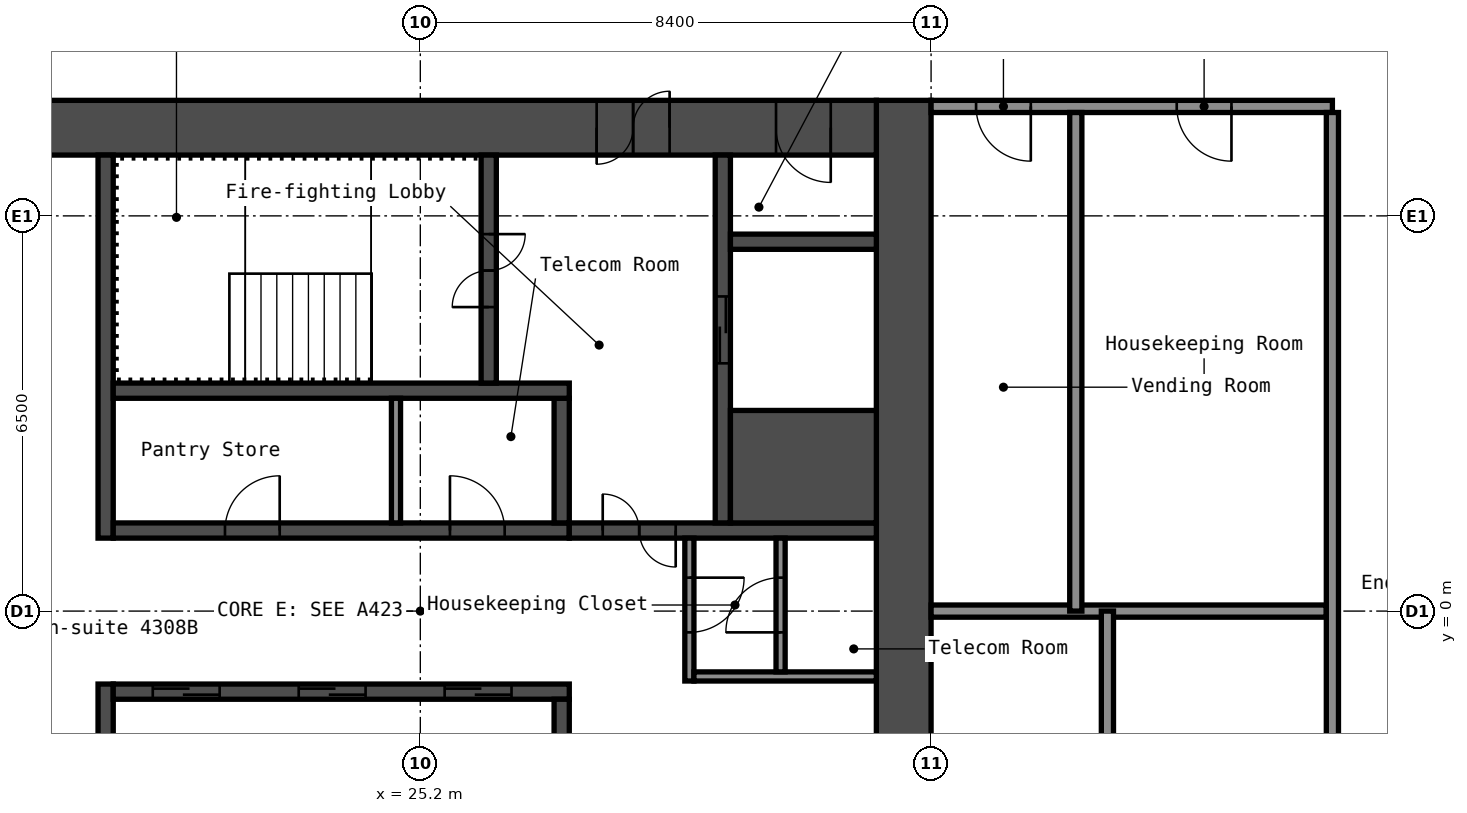
"""IFC4 building model, lengths in metres.
Left out: names, types, materials, properties, quantities, classifications, styles, units other than length and angle.
Written with IfcOpenShell. Run it as: python <this file> out.ifc"""

import sys

from ifc_helpers import new_model, si_unit, direction, frame, frame_2d, origin, place, context, subcontext, project, spatial, rectangle, extrude, element, fill, save


model = new_model("IFC4")
c1 = context("Model", 3, precision=1e-05, world=origin(), true_north=direction((0.0, 1.0)))
c2 = subcontext(c1, "Body", "Model", "MODEL_VIEW")
j1 = project(units=[si_unit("LENGTHUNIT", "METRE"), si_unit("PLANEANGLEUNIT", "RADIAN")], contexts=[c1])
p1 = place(None, origin())
s1 = spatial("IfcSite", under=j1, at=p1, CompositionType="ELEMENT")
p2 = place(p1, origin())
s2 = spatial("IfcBuilding", under=s1, at=p2, CompositionType="ELEMENT")
p3 = place(p2, frame((0.0, 0.0, 153.4)))
s3 = spatial("IfcBuildingStorey", under=s2, at=p3, CompositionType="ELEMENT", Elevation=153.4)
p4 = place(p3, frame((33.15, -8.4, 0.0), z_axis=(0.0, 0.0, 1.0), x_axis=(0.0, 1.0, 0.0)))
e1 = element("IfcWall", 1, at=p4, inside=s3, PredefinedType="SHEAR", context=c2, shape_type="SweptSolid", body=[
    extrude(rectangle(XDim=16.8, YDim=0.9, at=frame_2d((8.4, 0.0))), origin(), (0.0, 0.0, 1.0), 2.75),
])
p5 = place(p3, frame((17.7, 7.95, 0.0), z_axis=(0.0, 0.0, 1.0), x_axis=(1.0, 0.0, 0.0)))
e2 = element("IfcWall", 2, at=p5, inside=s3, PredefinedType="SHEAR", context=c2, shape_type="SweptSolid", body=[
    extrude(rectangle(XDim=15.0, YDim=0.9, at=frame_2d((7.5, 0.0))), origin(), (0.0, 0.0, 1.0), 2.75),
])
p6 = place(p5, frame((10.4, 0.0, 0.0)))
e3 = element("IfcOpeningElement", 3, at=p6, cuts=e2, PredefinedType="OPENING", context=c2, shape_type="SweptSolid", body=[
    extrude(rectangle(XDim=1.2, YDim=2.1, at=frame_2d((0.6, 1.05))), frame((0.0, 0.46, 0.0), z_axis=(0.0, -1.0, 0.0), x_axis=(1.0, 0.0, 0.0)), (0.0, 0.0, 1.0), 0.92),
])
p7 = place(p5, frame((13.35, 0.0, 0.0)))
e4 = element("IfcOpeningElement", 4, at=p7, cuts=e2, PredefinedType="OPENING", context=c2, shape_type="SweptSolid", body=[
    extrude(rectangle(XDim=0.9, YDim=2.1, at=frame_2d((0.45, 1.05))), frame((0.0, 0.46, 0.0), z_axis=(0.0, -1.0, 0.0), x_axis=(1.0, 0.0, 0.0)), (0.0, 0.0, 1.0), 0.92),
])
p8 = place(p3, frame((20.025, 1.2, 0.0), z_axis=(0.0, 0.0, 1.0), x_axis=(0.0, 1.0, 0.0)))
e5 = element("IfcWall", 5, at=p8, inside=s3, PredefinedType="SHEAR", context=c2, shape_type="SweptSolid", body=[
    extrude(rectangle(XDim=6.3, YDim=0.25, at=frame_2d((3.15, 0.0))), origin(), (0.0, 0.0, 1.0), 2.75),
])
p9 = place(p3, frame((20.025, -7.5, 0.0), z_axis=(0.0, 0.0, 1.0), x_axis=(0.0, 1.0, 0.0)))
e6 = element("IfcWall", 6, at=p9, inside=s3, PredefinedType="SHEAR", context=c2, shape_type="SweptSolid", body=[
    extrude(rectangle(XDim=6.3, YDim=0.25, at=frame_2d((3.15, 0.0))), origin(), (0.0, 0.0, 1.0), 2.75),
])
p10 = place(p9, frame((2.4, 0.0, 0.0)))
e7 = element("IfcOpeningElement", 7, at=p10, cuts=e6, PredefinedType="OPENING", context=c2, shape_type="SweptSolid", body=[
    extrude(rectangle(XDim=1.0, YDim=2.1, at=frame_2d((0.5, 1.05))), frame((0.0, 0.135, 0.0), z_axis=(0.0, -1.0, 0.0), x_axis=(1.0, 0.0, 0.0)), (0.0, 0.0, 1.0), 0.27),
])
p11 = place(p3, frame((20.15, 1.325, 0.0), z_axis=(0.0, 0.0, 1.0), x_axis=(1.0, 0.0, 0.0)))
e8 = element("IfcWall", 8, at=p11, inside=s3, PredefinedType="SHEAR", context=c2, shape_type="SweptSolid", body=[
    extrude(rectangle(XDim=7.5, YDim=0.25, at=frame_2d((3.75, 0.0))), origin(), (0.0, 0.0, 1.0), 2.75),
])
p12 = place(p11, frame((1.837, 0.0, 0.0)))
e9 = element("IfcOpeningElement", 9, at=p12, cuts=e8, PredefinedType="OPENING", context=c2, shape_type="SweptSolid", body=[
    extrude(rectangle(XDim=0.9, YDim=2.1, at=frame_2d((0.45, 1.05))), frame((0.0, 0.135, 0.0), z_axis=(0.0, -1.0, 0.0), x_axis=(1.0, 0.0, 0.0)), (0.0, 0.0, 1.0), 0.27),
])
p13 = place(p11, frame((5.538, 0.0, 0.0)))
e10 = element("IfcOpeningElement", 10, at=p13, cuts=e8, PredefinedType="OPENING", context=c2, shape_type="SweptSolid", body=[
    extrude(rectangle(XDim=0.9, YDim=2.1, at=frame_2d((0.45, 1.05))), frame((0.0, 0.135, 0.0), z_axis=(0.0, -1.0, 0.0), x_axis=(1.0, 0.0, 0.0)), (0.0, 0.0, 1.0), 0.27),
])
p14 = place(p3, frame((27.525, 1.45, 0.0), z_axis=(0.0, 0.0, 1.0), x_axis=(0.0, 1.0, 0.0)))
e11 = element("IfcWall", 11, at=p14, inside=s3, PredefinedType="SHEAR", context=c2, shape_type="SweptSolid", body=[
    extrude(rectangle(XDim=2.05, YDim=0.25, at=frame_2d((1.025, 0.0))), origin(), (0.0, 0.0, 1.0), 2.75),
])
p15 = place(p3, frame((20.15, 3.625, 0.0), z_axis=(0.0, 0.0, 1.0), x_axis=(1.0, 0.0, 0.0)))
e12 = element("IfcWall", 12, at=p15, inside=s3, PredefinedType="SHEAR", context=c2, shape_type="SweptSolid", body=[
    extrude(rectangle(XDim=7.5, YDim=0.25, at=frame_2d((3.75, 0.0))), origin(), (0.0, 0.0, 1.0), 2.75),
])
p16 = place(p3, frame((26.325, 3.75, 0.0), z_axis=(0.0, 0.0, 1.0), x_axis=(0.0, 1.0, 0.0)))
e13 = element("IfcWall", 13, at=p16, inside=s3, PredefinedType="SHEAR", context=c2, shape_type="SweptSolid", body=[
    extrude(rectangle(XDim=3.75, YDim=0.25, at=frame_2d((1.875, 0.0))), origin(), (0.0, 0.0, 1.0), 2.75),
])
p17 = place(p16, frame((1.25, 0.0, 0.0)))
e14 = element("IfcOpeningElement", 14, at=p17, cuts=e13, PredefinedType="OPENING", context=c2, shape_type="SweptSolid", body=[
    extrude(rectangle(XDim=1.2, YDim=2.1, at=frame_2d((0.6, 1.05))), frame((0.0, 0.135, 0.0), z_axis=(0.0, -1.0, 0.0), x_axis=(1.0, 0.0, 0.0)), (0.0, 0.0, 1.0), 0.27),
])
p18 = place(p3, frame((27.65, 1.325, 0.0), z_axis=(0.0, 0.0, 1.0), x_axis=(1.0, 0.0, 0.0)))
e15 = element("IfcWall", 15, at=p18, inside=s3, PredefinedType="SHEAR", context=c2, shape_type="SweptSolid", body=[
    extrude(rectangle(XDim=5.05, YDim=0.25, at=frame_2d((2.525, 0.0))), origin(), (0.0, 0.0, 1.0), 2.75),
])
p19 = place(p18, frame((0.55, 0.0, 0.0)))
e16 = element("IfcOpeningElement", 16, at=p19, cuts=e15, PredefinedType="OPENING", context=c2, shape_type="SweptSolid", body=[
    extrude(rectangle(XDim=1.2, YDim=2.1, at=frame_2d((0.6, 1.05))), frame((0.0, 0.135, 0.0), z_axis=(0.0, -1.0, 0.0), x_axis=(1.0, 0.0, 0.0)), (0.0, 0.0, 1.0), 0.27),
])
p20 = place(p3, frame((30.175, 1.45, 0.0), z_axis=(0.0, 0.0, 1.0), x_axis=(0.0, 1.0, 0.0)))
e17 = element("IfcWall", 17, at=p20, inside=s3, PredefinedType="SHEAR", context=c2, shape_type="SweptSolid", body=[
    extrude(rectangle(XDim=6.05, YDim=0.25, at=frame_2d((3.025, 0.0))), origin(), (0.0, 0.0, 1.0), 2.75),
])
p21 = place(p20, frame((2.625, 0.0, 0.0)))
e18 = element("IfcOpeningElement", 18, at=p21, cuts=e17, PredefinedType="OPENING", context=c2, shape_type="SweptSolid", body=[
    extrude(rectangle(XDim=1.1, YDim=2.1, at=frame_2d((0.55, 1.05))), frame((0.0, 0.135, 0.0), z_axis=(0.0, -1.0, 0.0), x_axis=(1.0, 0.0, 0.0)), (0.0, 0.0, 1.0), 0.27),
])
p22 = place(p3, frame((30.3, 2.375, 0.0), z_axis=(0.0, 0.0, 1.0), x_axis=(1.0, 0.0, 0.0)))
e19 = element("IfcWall", 19, at=p22, inside=s3, PredefinedType="SHEAR", context=c2, shape_type="SweptSolid", body=[
    extrude(rectangle(XDim=2.4, YDim=1.85, at=frame_2d((1.2, 0.0))), origin(), (0.0, 0.0, 1.0), 2.75),
])
p23 = place(p3, frame((30.3, 6.075, 0.0), z_axis=(0.0, 0.0, 1.0), x_axis=(1.0, 0.0, 0.0)))
e20 = element("IfcWall", 20, at=p23, inside=s3, PredefinedType="SHEAR", context=c2, shape_type="SweptSolid", body=[
    extrude(rectangle(XDim=2.4, YDim=0.25, at=frame_2d((1.2, 0.0))), origin(), (0.0, 0.0, 1.0), 2.75),
])
p24 = place(p3, frame((20.15, -1.325, 0.0), z_axis=(0.0, 0.0, 1.0), x_axis=(1.0, 0.0, 0.0)))
e21 = element("IfcWall", 21, at=p24, inside=s3, PredefinedType="SHEAR", context=c2, shape_type="SweptSolid", body=[
    extrude(rectangle(XDim=7.5, YDim=0.25, at=frame_2d((3.75, 0.0))), origin(), (0.0, 0.0, 1.0), 2.75),
])
p25 = place(p24, frame((0.65, 0.0, 0.0)))
e22 = element("IfcOpeningElement", 22, at=p25, cuts=e21, PredefinedType="OPENING", context=c2, shape_type="SweptSolid", body=[
    extrude(rectangle(XDim=1.1, YDim=2.1, at=frame_2d((0.55, 1.05))), frame((0.0, 0.135, 0.0), z_axis=(0.0, -1.0, 0.0), x_axis=(1.0, 0.0, 0.0)), (0.0, 0.0, 1.0), 0.27),
])
p26 = place(p24, frame((3.05, 0.0, 0.0)))
e23 = element("IfcOpeningElement", 23, at=p26, cuts=e21, PredefinedType="OPENING", context=c2, shape_type="SweptSolid", body=[
    extrude(rectangle(XDim=1.1, YDim=2.1, at=frame_2d((0.55, 1.05))), frame((0.0, 0.135, 0.0), z_axis=(0.0, -1.0, 0.0), x_axis=(1.0, 0.0, 0.0)), (0.0, 0.0, 1.0), 0.27),
])
p27 = place(p24, frame((5.45, 0.0, 0.0)))
e24 = element("IfcOpeningElement", 24, at=p27, cuts=e21, PredefinedType="OPENING", context=c2, shape_type="SweptSolid", body=[
    extrude(rectangle(XDim=1.1, YDim=2.1, at=frame_2d((0.55, 1.05))), frame((0.0, 0.135, 0.0), z_axis=(0.0, -1.0, 0.0), x_axis=(1.0, 0.0, 0.0)), (0.0, 0.0, 1.0), 0.27),
])
p28 = place(p3, frame((27.525, -3.5, 0.0), z_axis=(0.0, 0.0, 1.0), x_axis=(0.0, 1.0, 0.0)))
e25 = element("IfcWall", 25, at=p28, inside=s3, PredefinedType="SHEAR", context=c2, shape_type="SweptSolid", body=[
    extrude(rectangle(XDim=2.05, YDim=0.25, at=frame_2d((1.025, 0.0))), origin(), (0.0, 0.0, 1.0), 2.75),
])
p29 = place(p3, frame((29.625, -1.15, 0.0), z_axis=(0.0, 0.0, 1.0), x_axis=(0.0, 1.0, 0.0)))
e26 = element("IfcWall", 26, at=p29, inside=s3, PredefinedType="PARTITIONING", context=c2, shape_type="SweptSolid", body=[
    extrude(rectangle(XDim=2.35, YDim=0.15, at=frame_2d((1.175, 0.0))), origin(), (0.0, 0.0, 1.0), 2.75),
])
p30 = place(p29, frame((0.8, 0.0, 0.0)))
e27 = element("IfcOpeningElement", 27, at=p30, cuts=e26, PredefinedType="OPENING", context=c2, shape_type="SweptSolid", body=[
    extrude(rectangle(XDim=0.9, YDim=2.1, at=frame_2d((0.45, 1.05))), frame((0.0, 0.085, 0.0), z_axis=(0.0, -1.0, 0.0), x_axis=(1.0, 0.0, 0.0)), (0.0, 0.0, 1.0), 0.17),
])
p31 = place(p3, frame((29.7, -1.075, 0.0), z_axis=(0.0, 0.0, 1.0), x_axis=(1.0, 0.0, 0.0)))
e28 = element("IfcWall", 28, at=p31, inside=s3, PredefinedType="PARTITIONING", context=c2, shape_type="SweptSolid", body=[
    extrude(rectangle(XDim=3.0, YDim=0.15, at=frame_2d((1.5, 0.0))), origin(), (0.0, 0.0, 1.0), 2.75),
])
p32 = place(p3, frame((31.125, -1.0, 0.0), z_axis=(0.0, 0.0, 1.0), x_axis=(0.0, 1.0, 0.0)))
e29 = element("IfcWall", 29, at=p32, inside=s3, PredefinedType="PARTITIONING", context=c2, shape_type="SweptSolid", body=[
    extrude(rectangle(XDim=2.2, YDim=0.15, at=frame_2d((1.1, 0.0))), origin(), (0.0, 0.0, 1.0), 2.75),
])
p33 = place(p32, frame((0.65, 0.0, 0.0)))
e30 = element("IfcOpeningElement", 30, at=p33, cuts=e29, PredefinedType="OPENING", context=c2, shape_type="SweptSolid", body=[
    extrude(rectangle(XDim=0.9, YDim=2.1, at=frame_2d((0.45, 1.05))), frame((0.0, 0.085, 0.0), z_axis=(0.0, -1.0, 0.0), x_axis=(1.0, 0.0, 0.0)), (0.0, 0.0, 1.0), 0.17),
])
p34 = place(p3, frame((24.8, 1.45, 0.0), z_axis=(0.0, 0.0, 1.0), x_axis=(0.0, 1.0, 0.0)))
e31 = element("IfcWall", 31, at=p34, inside=s3, PredefinedType="PARTITIONING", context=c2, shape_type="SweptSolid", body=[
    extrude(rectangle(XDim=2.05, YDim=0.15, at=frame_2d((1.025, 0.0))), origin(), (0.0, 0.0, 1.0), 2.75),
])
p35 = place(p3, frame((33.6, 0.0, 0.0), z_axis=(0.0, 0.0, 1.0), x_axis=(1.0, 0.0, 0.0)))
e32 = element("IfcWall", 32, at=p35, inside=s3, PredefinedType="PARTITIONING", context=c2, shape_type="SweptSolid", body=[
    extrude(rectangle(XDim=6.5, YDim=0.2, at=frame_2d((3.25, 0.0))), origin(), (0.0, 0.0, 1.0), 2.75),
])
p36 = place(p3, frame((33.6, 8.3, 0.0), z_axis=(0.0, 0.0, 1.0), x_axis=(1.0, 0.0, 0.0)))
e33 = element("IfcWall", 33, at=p36, inside=s3, PredefinedType="PARTITIONING", context=c2, shape_type="SweptSolid", body=[
    extrude(rectangle(XDim=6.6, YDim=0.2, at=frame_2d((3.3, 0.0))), origin(), (0.0, 0.0, 1.0), 2.75),
])
p37 = place(p36, frame((0.74, 0.0, 0.0)))
e34 = element("IfcOpeningElement", 34, at=p37, cuts=e33, PredefinedType="OPENING", context=c2, shape_type="SweptSolid", body=[
    extrude(rectangle(XDim=0.9, YDim=2.1, at=frame_2d((0.45, 1.05))), frame((0.0, 0.11, 0.0), z_axis=(0.0, -1.0, 0.0), x_axis=(1.0, 0.0, 0.0)), (0.0, 0.0, 1.0), 0.22),
])
p38 = place(p36, frame((4.04, 0.0, 0.0)))
e35 = element("IfcOpeningElement", 35, at=p38, cuts=e33, PredefinedType="OPENING", context=c2, shape_type="SweptSolid", body=[
    extrude(rectangle(XDim=0.9, YDim=2.1, at=frame_2d((0.45, 1.05))), frame((0.0, 0.11, 0.0), z_axis=(0.0, -1.0, 0.0), x_axis=(1.0, 0.0, 0.0)), (0.0, 0.0, 1.0), 0.22),
])
for number, where, z_axis, x_axis in (
    (36, (35.98, 0.0, 0.0), (0.0, 0.0, 1.0), (0.0, 1.0, 0.0)),
    (37, (36.5, -8.2, 0.0), (0.0, 0.0, 1.0), (0.0, 1.0, 0.0)),
):
    element("IfcWall", number, at=place(p3, frame(where, z_axis=z_axis, x_axis=x_axis)), inside=s3, PredefinedType="PARTITIONING", context=c2, shape_type="SweptSolid", body=[
        extrude(rectangle(XDim=8.2, YDim=0.2, at=frame_2d((4.1, 0.0))), origin(), (0.0, 0.0, 1.0), 2.75),
    ])
p39 = place(p3, frame((40.2, -8.2, 0.0), z_axis=(0.0, 0.0, 1.0), x_axis=(0.0, 1.0, 0.0)))
e38 = element("IfcWall", 38, at=p39, inside=s3, PredefinedType="PARTITIONING", context=c2, shape_type="SweptSolid", body=[
    extrude(rectangle(XDim=16.4, YDim=0.2, at=frame_2d((8.2, 0.0))), origin(), (0.0, 0.0, 1.0), 2.75),
])
p40 = place(p6, origin())
e39 = element("IfcDoor", 39, at=p40, inside=s3, OperationType="DOUBLE_DOOR_SINGLE_SWING", PredefinedType="DOOR", context=c2, shape_type="SweptSolid", body=[
    extrude(rectangle(XDim=1.2, YDim=2.1, at=frame_2d((0.6, 1.05))), frame((0.0, 0.025, 0.0), z_axis=(0.0, -1.0, 0.0), x_axis=(1.0, 0.0, 0.0)), (0.0, 0.0, 1.0), 0.05),
])
fill(e3, e39)
p41 = place(p7, origin())
e40 = element("IfcDoor", 40, at=p41, inside=s3, OperationType="SINGLE_SWING_RIGHT", PredefinedType="DOOR", context=c2, shape_type="SweptSolid", body=[
    extrude(rectangle(XDim=0.9, YDim=2.1, at=frame_2d((0.45, 1.05))), frame((0.0, 0.025, 0.0), z_axis=(0.0, -1.0, 0.0), x_axis=(1.0, 0.0, 0.0)), (0.0, 0.0, 1.0), 0.05),
])
fill(e4, e40)
p42 = place(p17, origin())
e41 = element("IfcDoor", 41, at=p42, inside=s3, OperationType="DOUBLE_DOOR_SINGLE_SWING", PredefinedType="DOOR", context=c2, shape_type="SweptSolid", body=[
    extrude(rectangle(XDim=1.2, YDim=2.1, at=frame_2d((0.6, 1.05))), frame((0.0, 0.025, 0.0), z_axis=(0.0, -1.0, 0.0), x_axis=(1.0, 0.0, 0.0)), (0.0, 0.0, 1.0), 0.05),
])
fill(e14, e41)
p43 = place(p19, origin())
e42 = element("IfcDoor", 42, at=p43, inside=s3, OperationType="DOUBLE_DOOR_SINGLE_SWING", PredefinedType="DOOR", context=c2, shape_type="SweptSolid", body=[
    extrude(rectangle(XDim=1.2, YDim=2.1, at=frame_2d((0.6, 1.05))), frame((0.0, 0.025, 0.0), z_axis=(0.0, -1.0, 0.0), x_axis=(1.0, 0.0, 0.0)), (0.0, 0.0, 1.0), 0.05),
])
fill(e16, e42)
p44 = place(p30, origin())
e43 = element("IfcDoor", 43, at=p44, inside=s3, OperationType="SINGLE_SWING_RIGHT", PredefinedType="DOOR", context=c2, shape_type="SweptSolid", body=[
    extrude(rectangle(XDim=0.9, YDim=2.1, at=frame_2d((0.45, 1.05))), frame((0.0, 0.025, 0.0), z_axis=(0.0, -1.0, 0.0), x_axis=(1.0, 0.0, 0.0)), (0.0, 0.0, 1.0), 0.05),
])
fill(e27, e43)
p45 = place(p33, origin())
e44 = element("IfcDoor", 44, at=p45, inside=s3, OperationType="SINGLE_SWING_RIGHT", PredefinedType="DOOR", context=c2, shape_type="SweptSolid", body=[
    extrude(rectangle(XDim=0.9, YDim=2.1, at=frame_2d((0.45, 1.05))), frame((0.0, 0.025, 0.0), z_axis=(0.0, -1.0, 0.0), x_axis=(1.0, 0.0, 0.0)), (0.0, 0.0, 1.0), 0.05),
])
fill(e30, e44)
p46 = place(p12, origin())
e45 = element("IfcDoor", 45, at=p46, inside=s3, OperationType="SINGLE_SWING_LEFT", PredefinedType="DOOR", context=c2, shape_type="SweptSolid", body=[
    extrude(rectangle(XDim=0.9, YDim=2.1, at=frame_2d((0.45, 1.05))), frame((0.0, 0.025, 0.0), z_axis=(0.0, -1.0, 0.0), x_axis=(1.0, 0.0, 0.0)), (0.0, 0.0, 1.0), 0.05),
])
fill(e9, e45)
p47 = place(p13, origin())
e46 = element("IfcDoor", 46, at=p47, inside=s3, OperationType="SINGLE_SWING_RIGHT", PredefinedType="DOOR", context=c2, shape_type="SweptSolid", body=[
    extrude(rectangle(XDim=0.9, YDim=2.1, at=frame_2d((0.45, 1.05))), frame((0.0, 0.025, 0.0), z_axis=(0.0, -1.0, 0.0), x_axis=(1.0, 0.0, 0.0)), (0.0, 0.0, 1.0), 0.05),
])
fill(e10, e46)
p48 = place(p25, origin())
e47 = element("IfcDoor", 47, at=p48, inside=s3, OperationType="DOUBLE_DOOR_SLIDING", PredefinedType="DOOR", context=c2, shape_type="SweptSolid", body=[
    extrude(rectangle(XDim=1.1, YDim=2.1, at=frame_2d((0.55, 1.05))), frame((0.0, 0.025, 0.0), z_axis=(0.0, -1.0, 0.0), x_axis=(1.0, 0.0, 0.0)), (0.0, 0.0, 1.0), 0.05),
])
fill(e22, e47)
p49 = place(p26, origin())
e48 = element("IfcDoor", 48, at=p49, inside=s3, OperationType="DOUBLE_DOOR_SLIDING", PredefinedType="DOOR", context=c2, shape_type="SweptSolid", body=[
    extrude(rectangle(XDim=1.1, YDim=2.1, at=frame_2d((0.55, 1.05))), frame((0.0, 0.025, 0.0), z_axis=(0.0, -1.0, 0.0), x_axis=(1.0, 0.0, 0.0)), (0.0, 0.0, 1.0), 0.05),
])
fill(e23, e48)
p50 = place(p27, origin())
e49 = element("IfcDoor", 49, at=p50, inside=s3, OperationType="DOUBLE_DOOR_SLIDING", PredefinedType="DOOR", context=c2, shape_type="SweptSolid", body=[
    extrude(rectangle(XDim=1.1, YDim=2.1, at=frame_2d((0.55, 1.05))), frame((0.0, 0.025, 0.0), z_axis=(0.0, -1.0, 0.0), x_axis=(1.0, 0.0, 0.0)), (0.0, 0.0, 1.0), 0.05),
])
fill(e24, e49)
p51 = place(p21, origin())
e50 = element("IfcDoor", 50, at=p51, inside=s3, OperationType="DOUBLE_DOOR_SLIDING", PredefinedType="DOOR", context=c2, shape_type="SweptSolid", body=[
    extrude(rectangle(XDim=1.1, YDim=2.1, at=frame_2d((0.55, 1.05))), frame((0.0, 0.025, 0.0), z_axis=(0.0, -1.0, 0.0), x_axis=(1.0, 0.0, 0.0)), (0.0, 0.0, 1.0), 0.05),
])
fill(e18, e50)
p52 = place(p37, origin())
e51 = element("IfcDoor", 51, at=p52, inside=s3, OperationType="SINGLE_SWING_RIGHT", PredefinedType="DOOR", context=c2, shape_type="SweptSolid", body=[
    extrude(rectangle(XDim=0.9, YDim=2.1, at=frame_2d((0.45, 1.05))), frame((0.0, 0.025, 0.0), z_axis=(0.0, -1.0, 0.0), x_axis=(1.0, 0.0, 0.0)), (0.0, 0.0, 1.0), 0.05),
])
fill(e34, e51)
p53 = place(p38, origin())
e52 = element("IfcDoor", 52, at=p53, inside=s3, OperationType="SINGLE_SWING_RIGHT", PredefinedType="DOOR", context=c2, shape_type="SweptSolid", body=[
    extrude(rectangle(XDim=0.9, YDim=2.1, at=frame_2d((0.45, 1.05))), frame((0.0, 0.025, 0.0), z_axis=(0.0, -1.0, 0.0), x_axis=(1.0, 0.0, 0.0)), (0.0, 0.0, 1.0), 0.05),
])
fill(e35, e52)
save(model, sys.argv[1])
